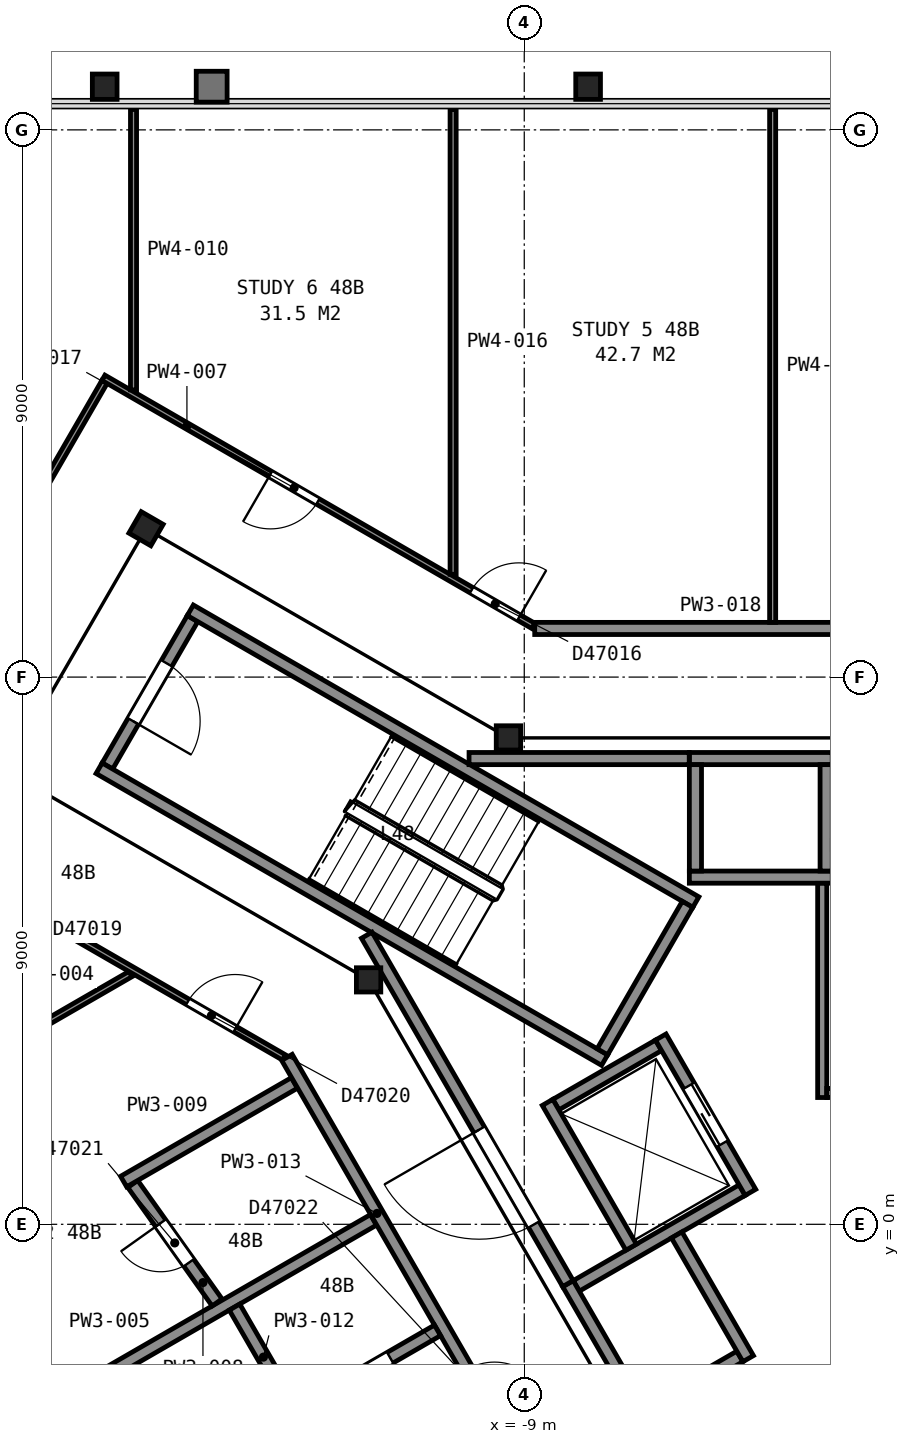
"""IFC4 building model, lengths in metres.
Left out: names, types, materials, properties, quantities, classifications, styles, units other than length and angle.
Written with IfcOpenShell. Run it as: python <this file> out.ifc"""

import sys

from ifc_helpers import new_model, si_unit, direction, frame, frame_2d, origin, origin_2d, place, context, subcontext, project, spatial, rectangle, i_section, extrude, element, fill, save


model = new_model("IFC4")
c1 = context("Model", 3, precision=1e-05, world=origin(), true_north=direction((0.0, 1.0)))
c2 = subcontext(c1, "Body", "Model", "MODEL_VIEW")
j1 = project(units=[si_unit("LENGTHUNIT", "METRE"), si_unit("PLANEANGLEUNIT", "RADIAN")], contexts=[c1])
p1 = place(None, origin())
s1 = spatial("IfcSite", under=j1, at=p1, CompositionType="ELEMENT")
p2 = place(p1, origin())
s2 = spatial("IfcBuilding", under=s1, at=p2, CompositionType="ELEMENT")
p3 = place(p2, frame((0.0, 0.0, 193.2)))
s3 = spatial("IfcBuildingStorey", under=s2, at=p3, CompositionType="ELEMENT", Elevation=193.2)
for number, where, z_axis, x_axis in (
    (1, (-7.95, 18.71, 0.0), (0.0, 0.0, 1.0), (1.0, 0.0, 0.0)),
    (2, (-15.9, 18.71, 0.0), (0.0, 0.0, 1.0), (1.0, 0.0, 0.0)),
):
    element("IfcColumn", number, at=place(p3, frame(where, z_axis=z_axis, x_axis=x_axis)), inside=s3, PredefinedType="COLUMN", context=c2, shape_type="SweptSolid", body=[
        extrude(i_section(OverallWidth=0.406, OverallDepth=0.417, WebThickness=0.03, FlangeThickness=0.048, FilletRadius=0.015, at=origin_2d()), origin(), (0.0, 0.0, 1.0), 3.7),
    ])
p4 = place(p3, frame((-9.26, 8.0, 0.0), z_axis=(0.0, 0.0, 1.0), x_axis=(1.0, 0.0, 0.0)))
e3 = element("IfcColumn", 3, at=p4, inside=s3, PredefinedType="COLUMN", context=c2, shape_type="SweptSolid", body=[
    extrude(i_section(OverallWidth=0.401, OverallDepth=0.399, WebThickness=0.025, FlangeThickness=0.04, FilletRadius=0.015, at=origin_2d()), origin(), (0.0, 0.0, 1.0), 3.7),
])
p5 = place(p3, frame((-15.22, 11.44, 0.0), z_axis=(0.0, 0.0, 1.0), x_axis=(0.5, 0.866025403784, 0.0)))
e4 = element("IfcColumn", 4, at=p5, inside=s3, PredefinedType="COLUMN", context=c2, shape_type="SweptSolid", body=[
    extrude(i_section(OverallWidth=0.406, OverallDepth=0.417, WebThickness=0.03, FlangeThickness=0.048, FilletRadius=0.015, at=origin_2d()), origin(), (0.0, 0.0, 1.0), 3.7),
])
p6 = place(p3, frame((-11.56, 4.02, 0.0), z_axis=(0.0, 0.0, 1.0), x_axis=(1.0, 0.0, 0.0)))
e5 = element("IfcColumn", 5, at=p6, inside=s3, PredefinedType="COLUMN", context=c2, shape_type="SweptSolid", body=[
    extrude(i_section(OverallWidth=0.401, OverallDepth=0.399, WebThickness=0.025, FlangeThickness=0.04, FilletRadius=0.015, at=origin_2d()), origin(), (0.0, 0.0, 1.0), 3.7),
])
p7 = place(p3, frame((-14.455, 9.962, 0.0), z_axis=(0.0, 0.0, 1.0), x_axis=(-0.500049511043, -0.865996816683, 0.0)))
e6 = element("IfcWall", 6, at=p7, inside=s3, PredefinedType="PARTITIONING", context=c2, shape_type="SweptSolid", body=[
    extrude(rectangle(XDim=2.8, YDim=0.2, at=frame_2d((1.4, 0.0))), origin(), (0.0, 0.0, 1.0), 3.45),
])
p8 = place(p7, frame((0.85, 0.0, 0.0)))
e7 = element("IfcOpeningElement", 7, at=p8, cuts=e6, PredefinedType="OPENING", context=c2, shape_type="SweptSolid", body=[
    extrude(rectangle(XDim=1.1, YDim=2.1, at=frame_2d((0.55, 1.05))), frame((0.0, 0.11, 0.0), z_axis=(0.0, -1.0, 0.0), x_axis=(1.0, 0.0, 0.0)), (0.0, 0.0, 1.0), 0.22),
])
for number, where, z_axis, x_axis in (
    (8, (-7.678, 2.701, 0.0), (0.0, 0.0, 1.0), (-0.866, 0.5, 0.0)),
    (9, (-6.178, 5.299, 0.0), (0.0, 0.0, 1.0), (-0.866, 0.5, 0.0)),
):
    element("IfcWall", number, at=place(p3, frame(where, z_axis=z_axis, x_axis=x_axis)), inside=s3, PredefinedType="PARTITIONING", context=c2, shape_type="SweptSolid", body=[
        extrude(rectangle(XDim=9.6, YDim=0.2, at=frame_2d((4.8, 0.0))), origin(), (0.0, 0.0, 1.0), 3.45),
    ])
p9 = place(p3, frame((-6.315, 5.262, 0.0), z_axis=(0.0, 0.0, 1.0), x_axis=(-0.500049511043, -0.865996816683, 0.0)))
e10 = element("IfcWall", 10, at=p9, inside=s3, PredefinedType="PARTITIONING", context=c2, shape_type="SweptSolid", body=[
    extrude(rectangle(XDim=2.8, YDim=0.2, at=frame_2d((1.4, 0.0))), origin(), (0.0, 0.0, 1.0), 3.45),
])
for number, where, z_axis, x_axis in (
    (11, (-6.285, 5.71, 0.0), (0.0, 0.0, 1.0), (1.0, 0.0, 0.0)),
    (12, (-6.285, 7.66, 0.0), (0.0, 0.0, 1.0), (1.0, 0.0, 0.0)),
):
    element("IfcWall", number, at=place(p3, frame(where, z_axis=z_axis, x_axis=x_axis)), inside=s3, PredefinedType="PARTITIONING", context=c2, shape_type="SweptSolid", body=[
        extrude(rectangle(XDim=2.35, YDim=0.2, at=frame_2d((1.175, 0.0))), origin(), (0.0, 0.0, 1.0), 3.7),
    ])
p10 = place(p3, frame((-6.97, -3.048, 0.0), z_axis=(0.0, 0.0, 1.0), x_axis=(0.866036909293, 0.499980071345, 0.0)))
e13 = element("IfcWall", 13, at=p10, inside=s3, PredefinedType="PARTITIONING", context=c2, shape_type="SweptSolid", body=[
    extrude(rectangle(XDim=1.75, YDim=0.2, at=frame_2d((0.875, 0.0))), origin(), (0.0, 0.0, 1.0), 3.7),
])
p11 = place(p3, frame((-8.145, -1.013, 0.0), z_axis=(0.0, 0.0, 1.0), x_axis=(0.866016494683, 0.500015430699, 0.0)))
e14 = element("IfcWall", 14, at=p11, inside=s3, PredefinedType="PARTITIONING", context=c2, shape_type="SweptSolid", body=[
    extrude(rectangle(XDim=3.15, YDim=0.2, at=frame_2d((1.575, 0.0))), origin(), (0.0, 0.0, 1.0), 3.7),
])
p12 = place(p3, frame((-8.48, 1.969, 0.0), z_axis=(0.0, 0.0, 1.0), x_axis=(0.866000020948, 0.500043961785, 0.0)))
e15 = element("IfcWall", 15, at=p12, inside=s3, PredefinedType="PARTITIONING", context=c2, shape_type="SweptSolid", body=[
    extrude(rectangle(XDim=1.95, YDim=0.2, at=frame_2d((0.975, 0.0))), origin(), (0.0, 0.0, 1.0), 3.7),
])
for number, where, z_axis, x_axis in (
    (16, (-4.035, 5.81, 0.0), (0.0, 0.0, 1.0), (0.0, 1.0, 0.0)),
    (17, (-6.185, 5.81, 0.0), (0.0, 0.0, 1.0), (0.0, 1.0, 0.0)),
):
    element("IfcWall", number, at=place(p3, frame(where, z_axis=z_axis, x_axis=x_axis)), inside=s3, PredefinedType="PARTITIONING", context=c2, shape_type="SweptSolid", body=[
        extrude(rectangle(XDim=1.75, YDim=0.2, at=frame_2d((0.875, 0.0))), origin(), (0.0, 0.0, 1.0), 3.7),
    ])
p13 = place(p3, frame((-5.28, 0.525, 0.0), z_axis=(0.0, 0.0, 1.0), x_axis=(-0.500037662692, 0.866003658127, 0.0)))
e18 = element("IfcWall", 18, at=p13, inside=s3, PredefinedType="PARTITIONING", context=c2, shape_type="SweptSolid", body=[
    extrude(rectangle(XDim=2.95, YDim=0.2, at=frame_2d((1.475, 0.0))), origin(), (0.0, 0.0, 1.0), 3.7),
])
p14 = place(p13, frame((0.925, 0.0, 0.0)))
e19 = element("IfcOpeningElement", 19, at=p14, cuts=e18, PredefinedType="OPENING", context=c2, shape_type="SweptSolid", body=[
    extrude(rectangle(XDim=1.1, YDim=2.1, at=frame_2d((0.55, 1.05))), frame((0.0, 0.11, 0.0), z_axis=(0.0, -1.0, 0.0), x_axis=(1.0, 0.0, 0.0)), (0.0, 0.0, 1.0), 0.22),
])
p15 = place(p3, frame((-5.318, -2.21, 0.0), z_axis=(0.0, 0.0, 1.0), x_axis=(-0.499938297808, 0.866061024631, 0.0)))
e20 = element("IfcWall", 20, at=p15, inside=s3, PredefinedType="PARTITIONING", context=c2, shape_type="SweptSolid", body=[
    extrude(rectangle(XDim=2.35, YDim=0.2, at=frame_2d((1.175, 0.0))), origin(), (0.0, 0.0, 1.0), 3.7),
])
p16 = place(p3, frame((-7.242, -0.376, 0.0), z_axis=(0.0, 0.0, 1.0), x_axis=(-0.499996545922, 0.866027397988, 0.0)))
e21 = element("IfcWall", 21, at=p16, inside=s3, PredefinedType="PARTITIONING", context=c2, shape_type="SweptSolid", body=[
    extrude(rectangle(XDim=2.75, YDim=0.2, at=frame_2d((1.375, 0.0))), origin(), (0.0, 0.0, 1.0), 3.7),
])
p17 = place(p3, frame((-7.006, -3.185, 0.0), z_axis=(0.0, 0.0, 1.0), x_axis=(-0.499990435942, 0.866030925526, 0.0)))
e22 = element("IfcWall", 22, at=p17, inside=s3, PredefinedType="PARTITIONING", context=c2, shape_type="SweptSolid", body=[
    extrude(rectangle(XDim=2.55, YDim=0.2, at=frame_2d((1.275, 0.0))), origin(), (0.0, 0.0, 1.0), 3.7),
])
p18 = place(p3, frame((-11.591, 4.755, 0.0), z_axis=(0.0, 0.0, 1.0), x_axis=(0.500043977787, -0.866000011708, 0.0)))
e23 = element("IfcWall", 23, at=p18, inside=s3, PredefinedType="PARTITIONING", context=c2, shape_type="SweptSolid", body=[
    extrude(rectangle(XDim=6.617, YDim=0.2, at=frame_2d((3.308, 0.0))), origin(), (0.0, 0.0, 1.0), 3.45),
])
p19 = place(p18, frame((3.695, 0.0, 0.0)))
e24 = element("IfcOpeningElement", 24, at=p19, cuts=e23, PredefinedType="OPENING", context=c2, shape_type="SweptSolid", body=[
    extrude(rectangle(XDim=1.8, YDim=2.1, at=frame_2d((0.9, 1.05))), frame((0.0, 0.11, 0.0), z_axis=(0.0, -1.0, 0.0), x_axis=(1.0, 0.0, 0.0)), (0.0, 0.0, 1.0), 0.22),
])
p20 = place(p3, frame((-9.908, 7.66, 0.0), z_axis=(0.0, 0.0, 1.0), x_axis=(1.0, 0.0, 0.0)))
e25 = element("IfcWall", 25, at=p20, inside=s3, PredefinedType="PARTITIONING", context=c2, shape_type="SweptSolid", body=[
    extrude(rectangle(XDim=3.621, YDim=0.2, at=frame_2d((1.811, 0.0))), origin(), (0.0, 0.0, 1.0), 3.45),
])
p21 = place(p3, frame((-4.1, 2.085, 0.0), z_axis=(0.0, 0.0, 1.0), x_axis=(0.0, 1.0, 0.0)))
e26 = element("IfcWall", 26, at=p21, inside=s3, PredefinedType="PARTITIONING", context=c2, shape_type="SweptSolid", body=[
    extrude(rectangle(XDim=3.523, YDim=0.15, at=frame_2d((1.761, 0.0))), origin(), (0.0, 0.0, 1.0), 3.45),
])
p22 = place(p3, frame((-4.025, 2.16, 0.0), z_axis=(0.0, 0.0, 1.0), x_axis=(1.0, 0.0, 0.0)))
e27 = element("IfcWall", 27, at=p22, inside=s3, PredefinedType="PARTITIONING", context=c2, shape_type="SweptSolid", body=[
    extrude(rectangle(XDim=1.238, YDim=0.15, at=frame_2d((0.619, 0.0))), origin(), (0.0, 0.0, 1.0), 3.45),
])
p23 = place(p3, frame((-21.53, 0.62, 0.0), z_axis=(0.0, 0.0, 1.0), x_axis=(0.865986079307, 0.500068105808, 0.0)))
e28 = element("IfcWall", 28, at=p23, inside=s3, PredefinedType="PARTITIONING", context=c2, shape_type="SweptSolid", body=[
    extrude(rectangle(XDim=6.99, YDim=0.1, at=frame_2d((3.495, 0.0))), origin(), (0.0, 0.0, 1.0), 2.713),
])
p24 = place(p3, frame((-19.955, 6.844, 0.0), z_axis=(0.0, 0.0, 1.0), x_axis=(0.500415732313, 0.865785247537, 0.0)))
e29 = element("IfcWall", 29, at=p24, inside=s3, PredefinedType="PARTITIONING", context=c2, shape_type="SweptSolid", body=[
    extrude(rectangle(XDim=8.097, YDim=0.1, at=frame_2d((4.049, 0.0))), origin(), (0.0, 0.0, 1.0), 2.713),
])
p25 = place(p24, frame((3.45, 0.0, 0.0)))
e30 = element("IfcOpeningElement", 30, at=p25, cuts=e29, PredefinedType="OPENING", context=c2, shape_type="SweptSolid", body=[
    extrude(rectangle(XDim=1.2, YDim=2.1, at=frame_2d((0.6, 1.05))), frame((0.0, 0.06, 0.0), z_axis=(0.0, -1.0, 0.0), x_axis=(1.0, 0.0, 0.0)), (0.0, 0.0, 1.0), 0.12),
])
p26 = place(p3, frame((-12.952, 2.744, 0.0), z_axis=(0.0, 0.0, 1.0), x_axis=(-0.86608949446, 0.499888975259, 0.0)))
e31 = element("IfcWall", 31, at=p26, inside=s3, PredefinedType="PARTITIONING", context=c2, shape_type="SweptSolid", body=[
    extrude(rectangle(XDim=8.165, YDim=0.1, at=frame_2d((4.083, 0.0))), origin(), (0.0, 0.0, 1.0), 2.713),
])
p27 = place(p26, frame((4.741, 0.0, 0.0)))
e32 = element("IfcOpeningElement", 32, at=p27, cuts=e31, PredefinedType="OPENING", context=c2, shape_type="SweptSolid", body=[
    extrude(rectangle(XDim=0.9, YDim=2.1, at=frame_2d((0.45, 1.05))), frame((0.0, 0.06, 0.0), z_axis=(0.0, -1.0, 0.0), x_axis=(1.0, 0.0, 0.0)), (0.0, 0.0, 1.0), 0.12),
])
p28 = place(p26, frame((0.928, 0.0, 0.0)))
e33 = element("IfcOpeningElement", 33, at=p28, cuts=e31, PredefinedType="OPENING", context=c2, shape_type="SweptSolid", body=[
    extrude(rectangle(XDim=0.9, YDim=2.1, at=frame_2d((0.45, 1.05))), frame((0.0, 0.06, 0.0), z_axis=(0.0, -1.0, 0.0), x_axis=(1.0, 0.0, 0.0)), (0.0, 0.0, 1.0), 0.12),
])
p29 = place(p3, frame((-18.78, -4.142, 0.0), z_axis=(0.0, 0.0, 1.0), x_axis=(0.866020616849, 0.500008291124, 0.0)))
e34 = element("IfcWall", 34, at=p29, inside=s3, PredefinedType="PARTITIONING", context=c2, shape_type="SweptSolid", body=[
    extrude(rectangle(XDim=8.428, YDim=0.2, at=frame_2d((4.214, 0.0))), origin(), (0.0, 0.0, 1.0), 2.713),
])
p30 = place(p3, frame((-15.921, 13.923, 0.0), z_axis=(0.0, 0.0, 1.0), x_axis=(0.866088973199, -0.499889878377, 0.0)))
e35 = element("IfcWall", 35, at=p30, inside=s3, PredefinedType="PARTITIONING", context=c2, shape_type="SweptSolid", body=[
    extrude(rectangle(XDim=8.163, YDim=0.1, at=frame_2d((4.082, 0.0))), origin(), (0.0, 0.0, 1.0), 2.713),
])
p31 = place(p30, frame((6.99, 0.0, 0.0)))
e36 = element("IfcOpeningElement", 36, at=p31, cuts=e35, PredefinedType="OPENING", context=c2, shape_type="SweptSolid", body=[
    extrude(rectangle(XDim=0.9, YDim=2.1, at=frame_2d((0.45, 1.05))), frame((0.0, 0.06, 0.0), z_axis=(0.0, -1.0, 0.0), x_axis=(1.0, 0.0, 0.0)), (0.0, 0.0, 1.0), 0.12),
])
p32 = place(p30, frame((3.172, 0.0, 0.0)))
e37 = element("IfcOpeningElement", 37, at=p32, cuts=e35, PredefinedType="OPENING", context=c2, shape_type="SweptSolid", body=[
    extrude(rectangle(XDim=0.9, YDim=2.1, at=frame_2d((0.45, 1.05))), frame((0.0, 0.06, 0.0), z_axis=(0.0, -1.0, 0.0), x_axis=(1.0, 0.0, 0.0)), (0.0, 0.0, 1.0), 0.12),
])
p33 = place(p3, frame((-15.438, 0.663, 0.0), z_axis=(0.0, 0.0, 1.0), x_axis=(0.579721135961, -0.81481495109, 0.0)))
e38 = element("IfcWall", 38, at=p33, inside=s3, PredefinedType="PARTITIONING", context=c2, shape_type="SweptSolid", body=[
    extrude(rectangle(XDim=2.392, YDim=0.2, at=frame_2d((1.196, 0.0))), origin(), (0.0, 0.0, 1.0), 2.713),
])
p34 = place(p33, frame((0.79, 0.0, 0.0)))
e39 = element("IfcOpeningElement", 39, at=p34, cuts=e38, PredefinedType="OPENING", context=c2, shape_type="SweptSolid", body=[
    extrude(rectangle(XDim=0.8, YDim=2.1, at=frame_2d((0.4, 1.05))), frame((0.0, 0.11, 0.0), z_axis=(0.0, -1.0, 0.0), x_axis=(1.0, 0.0, 0.0)), (0.0, 0.0, 1.0), 0.22),
])
p35 = place(p3, frame((-15.589, 0.703, 0.0), z_axis=(0.0, 0.0, 1.0), x_axis=(0.86594479446, 0.500139593461, 0.0)))
e40 = element("IfcWall", 40, at=p35, inside=s3, PredefinedType="PARTITIONING", context=c2, shape_type="SweptSolid", body=[
    extrude(rectangle(XDim=3.242, YDim=0.2, at=frame_2d((1.621, 0.0))), origin(), (0.0, 0.0, 1.0), 2.713),
])
p36 = place(p3, frame((-15.426, 13.724, 0.0), z_axis=(0.0, 0.0, 1.0), x_axis=(0.0, 1.0, 0.0)))
e41 = element("IfcWall", 41, at=p36, inside=s3, PredefinedType="PARTITIONING", context=c2, shape_type="SweptSolid", body=[
    extrude(rectangle(XDim=4.611, YDim=0.1, at=frame_2d((2.306, 0.0))), origin(), (0.0, 0.0, 1.0), 2.713),
])
p37 = place(p3, frame((-13.765, -1.362, 0.0), z_axis=(0.0, 0.0, 1.0), x_axis=(0.499911523785, -0.866076479525, 0.0)))
e42 = element("IfcWall", 42, at=p37, inside=s3, PredefinedType="PARTITIONING", context=c2, shape_type="SweptSolid", body=[
    extrude(rectangle(XDim=1.9, YDim=0.2, at=frame_2d((0.95, 0.0))), origin(), (0.0, 0.0, 1.0), 2.713),
])
p38 = place(p3, frame((-4.075, -12.545, 0.0), z_axis=(0.0, 0.0, 1.0), x_axis=(-0.499999743747, 0.866025551732, 0.0)))
e43 = element("IfcWall", 43, at=p38, inside=s3, PredefinedType="PARTITIONING", context=c2, shape_type="SweptSolid", body=[
    extrude(rectangle(XDim=17.656, YDim=0.2, at=frame_2d((8.828, 0.0))), origin(), (0.0, 0.0, 1.0), 2.713),
])
p39 = place(p38, frame((10.83, 0.0, 0.0)))
e44 = element("IfcOpeningElement", 44, at=p39, cuts=e43, PredefinedType="OPENING", context=c2, shape_type="SweptSolid", body=[
    extrude(rectangle(XDim=0.9, YDim=2.1, at=frame_2d((0.45, 1.05))), frame((0.0, 0.11, 0.0), z_axis=(0.0, -1.0, 0.0), x_axis=(1.0, 0.0, 0.0)), (0.0, 0.0, 1.0), 0.22),
])
p40 = place(p38, frame((7.148, 0.0, 0.0)))
e45 = element("IfcOpeningElement", 45, at=p40, cuts=e43, PredefinedType="OPENING", context=c2, shape_type="SweptSolid", body=[
    extrude(rectangle(XDim=0.9, YDim=2.1, at=frame_2d((0.45, 1.05))), frame((0.0, 0.11, 0.0), z_axis=(0.0, -1.0, 0.0), x_axis=(1.0, 0.0, 0.0)), (0.0, 0.0, 1.0), 0.22),
])
p41 = place(p38, frame((2.198, 0.0, 0.0)))
e46 = element("IfcOpeningElement", 46, at=p41, cuts=e43, PredefinedType="OPENING", context=c2, shape_type="SweptSolid", body=[
    extrude(rectangle(XDim=0.9, YDim=2.1, at=frame_2d((0.45, 1.05))), frame((0.0, 0.11, 0.0), z_axis=(0.0, -1.0, 0.0), x_axis=(1.0, 0.0, 0.0)), (0.0, 0.0, 1.0), 0.22),
])
p42 = place(p3, frame((-12.852, -3.144, 0.0), z_axis=(0.0, 0.0, 1.0), x_axis=(0.866018616679, 0.500011755427, 0.0)))
e47 = element("IfcWall", 47, at=p42, inside=s3, PredefinedType="PARTITIONING", context=c2, shape_type="SweptSolid", body=[
    extrude(rectangle(XDim=2.8, YDim=0.2, at=frame_2d((1.4, 0.0))), origin(), (0.0, 0.0, 1.0), 2.713),
])
p43 = place(p42, frame((1.1, 0.0, 0.0)))
e48 = element("IfcOpeningElement", 48, at=p43, cuts=e47, PredefinedType="OPENING", context=c2, shape_type="SweptSolid", body=[
    extrude(rectangle(XDim=0.8, YDim=2.1, at=frame_2d((0.4, 1.05))), frame((0.0, 0.11, 0.0), z_axis=(0.0, -1.0, 0.0), x_axis=(1.0, 0.0, 0.0)), (0.0, 0.0, 1.0), 0.22),
])
p44 = place(p3, frame((-10.17, 10.691, 0.0), z_axis=(0.0, 0.0, 1.0), x_axis=(0.0, 1.0, 0.0)))
e49 = element("IfcWall", 49, at=p44, inside=s3, PredefinedType="PARTITIONING", context=c2, shape_type="SweptSolid", body=[
    extrude(rectangle(XDim=7.644, YDim=0.1, at=frame_2d((3.822, 0.0))), origin(), (0.0, 0.0, 1.0), 2.713),
])
p45 = place(p3, frame((-8.828, 9.8, 0.0), z_axis=(0.0, 0.0, 1.0), x_axis=(1.0, 0.0, 0.0)))
e50 = element("IfcWall", 50, at=p45, inside=s3, PredefinedType="PARTITIONING", context=c2, shape_type="SweptSolid", body=[
    extrude(rectangle(XDim=17.706, YDim=0.2, at=frame_2d((8.853, 0.0))), origin(), (0.0, 0.0, 1.0), 2.713),
])
p46 = place(p45, frame((14.498, 0.0, 0.0)))
e51 = element("IfcOpeningElement", 51, at=p46, cuts=e50, PredefinedType="OPENING", context=c2, shape_type="SweptSolid", body=[
    extrude(rectangle(XDim=0.9, YDim=2.1, at=frame_2d((0.45, 1.05))), frame((0.0, 0.11, 0.0), z_axis=(0.0, -1.0, 0.0), x_axis=(1.0, 0.0, 0.0)), (0.0, 0.0, 1.0), 0.22),
])
p47 = place(p45, frame((10.919, 0.0, 0.0)))
e52 = element("IfcOpeningElement", 52, at=p47, cuts=e50, PredefinedType="OPENING", context=c2, shape_type="SweptSolid", body=[
    extrude(rectangle(XDim=0.9, YDim=2.1, at=frame_2d((0.45, 1.05))), frame((0.0, 0.11, 0.0), z_axis=(0.0, -1.0, 0.0), x_axis=(1.0, 0.0, 0.0)), (0.0, 0.0, 1.0), 0.22),
])
p48 = place(p45, frame((6.113, 0.0, 0.0)))
e53 = element("IfcOpeningElement", 53, at=p48, cuts=e50, PredefinedType="OPENING", context=c2, shape_type="SweptSolid", body=[
    extrude(rectangle(XDim=0.9, YDim=2.1, at=frame_2d((0.45, 1.05))), frame((0.0, 0.11, 0.0), z_axis=(0.0, -1.0, 0.0), x_axis=(1.0, 0.0, 0.0)), (0.0, 0.0, 1.0), 0.22),
])
p49 = place(p3, frame((-4.915, 9.9, 0.0), z_axis=(0.0, 0.0, 1.0), x_axis=(0.0, 1.0, 0.0)))
e54 = element("IfcWall", 54, at=p49, inside=s3, PredefinedType="PARTITIONING", context=c2, shape_type="SweptSolid", body=[
    extrude(rectangle(XDim=8.435, YDim=0.1, at=frame_2d((4.218, 0.0))), origin(), (0.0, 0.0, 1.0), 2.713),
])
p50 = place(p8, origin())
e55 = element("IfcDoor", 55, at=p50, inside=s3, OperationType="SINGLE_SWING_RIGHT", PredefinedType="DOOR", context=c2, shape_type="SweptSolid", body=[
    extrude(rectangle(XDim=1.1, YDim=2.1, at=frame_2d((0.55, 1.05))), frame((0.0, 0.025, 0.0), z_axis=(0.0, -1.0, 0.0), x_axis=(1.0, 0.0, 0.0)), (0.0, 0.0, 1.0), 0.05),
])
fill(e7, e55)
p51 = place(p14, origin())
e56 = element("IfcDoor", 56, at=p51, inside=s3, OperationType="SLIDING_TO_LEFT", PredefinedType="DOOR", context=c2, shape_type="SweptSolid", body=[
    extrude(rectangle(XDim=1.1, YDim=2.1, at=frame_2d((0.55, 1.05))), frame((0.0, 0.025, 0.0), z_axis=(0.0, -1.0, 0.0), x_axis=(1.0, 0.0, 0.0)), (0.0, 0.0, 1.0), 0.05),
])
fill(e19, e56)
p52 = place(p19, origin())
e57 = element("IfcDoor", 57, at=p52, inside=s3, OperationType="DOUBLE_DOOR_SINGLE_SWING", PredefinedType="DOOR", context=c2, shape_type="SweptSolid", body=[
    extrude(rectangle(XDim=1.8, YDim=2.1, at=frame_2d((0.9, 1.05))), frame((0.0, 0.025, 0.0), z_axis=(0.0, -1.0, 0.0), x_axis=(1.0, 0.0, 0.0)), (0.0, 0.0, 1.0), 0.05),
])
fill(e24, e57)
p53 = place(p28, origin())
e58 = element("IfcDoor", 58, at=p53, inside=s3, OperationType="SINGLE_SWING_LEFT", PredefinedType="DOOR", context=c2, shape_type="SweptSolid", body=[
    extrude(rectangle(XDim=0.9, YDim=2.1, at=frame_2d((0.45, 1.05))), frame((0.0, 0.025, 0.0), z_axis=(0.0, -1.0, 0.0), x_axis=(1.0, 0.0, 0.0)), (0.0, 0.0, 1.0), 0.05),
])
fill(e33, e58)
p54 = place(p31, origin())
e59 = element("IfcDoor", 59, at=p54, inside=s3, OperationType="SINGLE_SWING_RIGHT", PredefinedType="DOOR", context=c2, shape_type="SweptSolid", body=[
    extrude(rectangle(XDim=0.9, YDim=2.1, at=frame_2d((0.45, 1.05))), frame((0.0, 0.025, 0.0), z_axis=(0.0, -1.0, 0.0), x_axis=(1.0, 0.0, 0.0)), (0.0, 0.0, 1.0), 0.05),
])
fill(e36, e59)
p55 = place(p32, origin())
e60 = element("IfcDoor", 60, at=p55, inside=s3, OperationType="SINGLE_SWING_LEFT", PredefinedType="DOOR", context=c2, shape_type="SweptSolid", body=[
    extrude(rectangle(XDim=0.9, YDim=2.1, at=frame_2d((0.45, 1.05))), frame((0.0, 0.025, 0.0), z_axis=(0.0, -1.0, 0.0), x_axis=(1.0, 0.0, 0.0)), (0.0, 0.0, 1.0), 0.05),
])
fill(e37, e60)
p56 = place(p34, origin())
e61 = element("IfcDoor", 61, at=p56, inside=s3, OperationType="SINGLE_SWING_LEFT", PredefinedType="DOOR", context=c2, shape_type="SweptSolid", body=[
    extrude(rectangle(XDim=0.8, YDim=2.1, at=frame_2d((0.4, 1.05))), frame((0.0, 0.025, 0.0), z_axis=(0.0, -1.0, 0.0), x_axis=(1.0, 0.0, 0.0)), (0.0, 0.0, 1.0), 0.05),
])
fill(e39, e61)
p57 = place(p43, origin())
e62 = element("IfcDoor", 62, at=p57, inside=s3, OperationType="SINGLE_SWING_LEFT", PredefinedType="DOOR", context=c2, shape_type="SweptSolid", body=[
    extrude(rectangle(XDim=0.8, YDim=2.1, at=frame_2d((0.4, 1.05))), frame((0.0, 0.025, 0.0), z_axis=(0.0, -1.0, 0.0), x_axis=(1.0, 0.0, 0.0)), (0.0, 0.0, 1.0), 0.05),
])
fill(e48, e62)
save(model, sys.argv[1])
